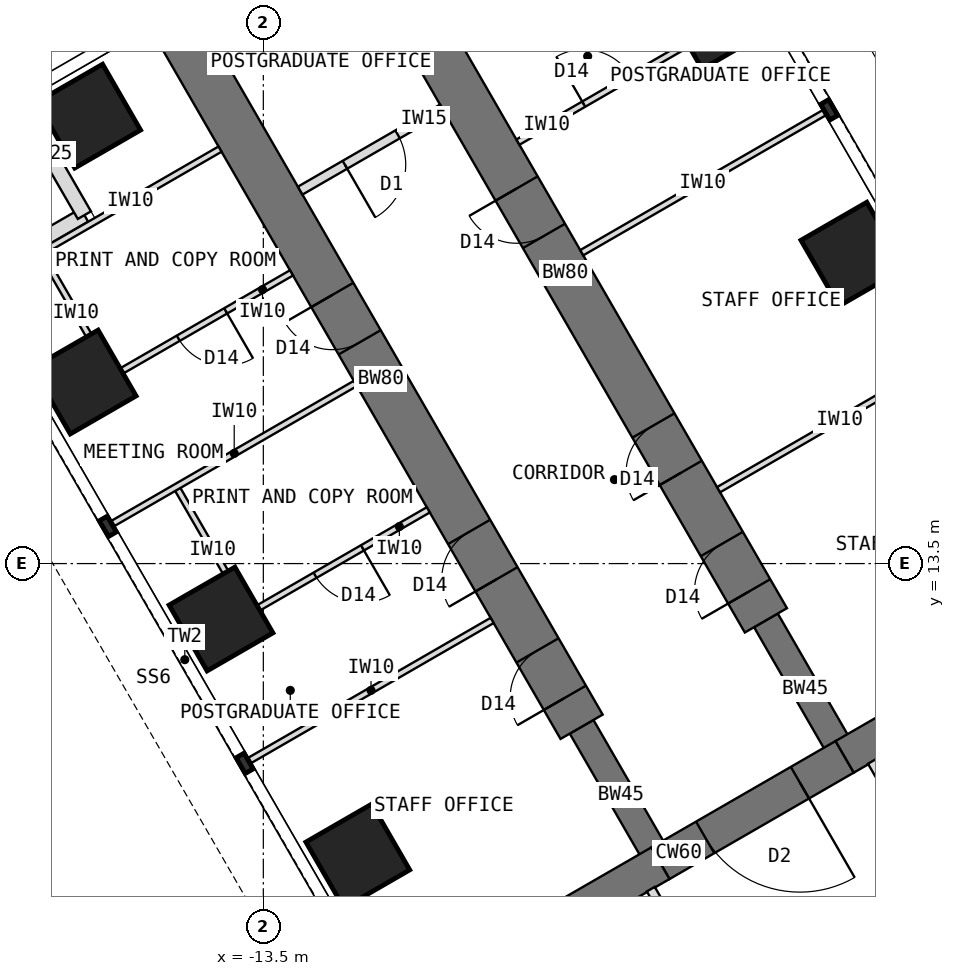
"""IFC4 building model, lengths in metres.
Left out: names, types, materials, properties, quantities, classifications, styles, units other than length and angle.
Written with IfcOpenShell. Run it as: python <this file> out.ifc"""

import sys

from ifc_helpers import new_model, si_unit, direction, frame, frame_2d, origin, origin_2d, place, context, subcontext, project, spatial, rectangle, extrude, element, fill, save


model = new_model("IFC4")
c1 = context("Model", 3, precision=1e-05, world=origin(), true_north=direction((0.0, 1.0)))
c2 = subcontext(c1, "Body", "Model", "MODEL_VIEW")
j1 = project(units=[si_unit("LENGTHUNIT", "METRE"), si_unit("PLANEANGLEUNIT", "RADIAN")], contexts=[c1])
p1 = place(None, origin())
s1 = spatial("IfcSite", under=j1, at=p1, CompositionType="ELEMENT")
p2 = place(p1, origin())
s2 = spatial("IfcBuilding", under=s1, at=p2, CompositionType="ELEMENT")
p3 = place(p2, frame((0.0, 0.0, 157.5)))
s3 = spatial("IfcBuildingStorey", under=s2, at=p3, CompositionType="ELEMENT", Elevation=157.5)
p4 = place(p3, frame((0.0, 12.596, 0.0), z_axis=(0.0, 0.0, 1.0), x_axis=(-0.866011268655, -0.500024481964, 0.0)))
e1 = element("IfcWall", 1, at=p4, inside=s3, PredefinedType="SHEAR", context=c2, shape_type="SweptSolid", body=[
    extrude(rectangle(XDim=4.548, YDim=0.6, at=frame_2d((2.274, 0.0))), origin(), (0.0, 0.0, 1.0), 4.0),
])
p5 = place(p3, frame((-3.939, 10.322, 0.0), z_axis=(0.0, 0.0, 1.0), x_axis=(-0.866019471182, -0.500010275428, 0.0)))
e2 = element("IfcWall", 2, at=p5, inside=s3, PredefinedType="SHEAR", context=c2, shape_type="SweptSolid", body=[
    extrude(rectangle(XDim=3.5, YDim=0.6, at=frame_2d((1.75, 0.0))), origin(), (0.0, 0.0, 1.0), 4.0),
])
p6 = place(p5, frame((0.85, 0.0, 0.0)))
e3 = element("IfcOpeningElement", 3, at=p6, cuts=e2, PredefinedType="OPENING", context=c2, shape_type="SweptSolid", body=[
    extrude(rectangle(XDim=1.8, YDim=2.1, at=frame_2d((0.9, 1.05))), frame((0.0, 0.31, 0.0), z_axis=(0.0, -1.0, 0.0), x_axis=(1.0, 0.0, 0.0)), (0.0, 0.0, 1.0), 0.62),
])
p7 = place(p3, frame((-6.97, 8.572, 0.0), z_axis=(0.0, 0.0, 1.0), x_axis=(-0.866034513004, -0.499984222037, 0.0)))
e4 = element("IfcWall", 4, at=p7, inside=s3, PredefinedType="SHEAR", context=c2, shape_type="SweptSolid", body=[
    extrude(rectangle(XDim=4.548, YDim=0.6, at=frame_2d((2.274, 0.0))), origin(), (0.0, 0.0, 1.0), 4.0),
])
p8 = place(p3, frame((-6.97, 8.572, 0.0), z_axis=(0.0, 0.0, 1.0), x_axis=(-0.499988811324, 0.866031863473, 0.0)))
e5 = element("IfcWall", 5, at=p8, inside=s3, PredefinedType="SHEAR", context=c2, shape_type="SweptSolid", body=[
    extrude(rectangle(XDim=2.592, YDim=0.45, at=frame_2d((1.296, 0.0))), origin(), (0.0, 0.0, 1.0), 4.0),
])
p9 = place(p3, frame((-8.266, 10.816, 0.0), z_axis=(0.0, 0.0, 1.0), x_axis=(-0.499996231654, 0.866027579429, 0.0)))
e6 = element("IfcWall", 6, at=p9, inside=s3, PredefinedType="SHEAR", context=c2, shape_type="SweptSolid", body=[
    extrude(rectangle(XDim=13.2, YDim=0.8, at=frame_2d((6.6, 0.0))), origin(), (0.0, 0.0, 1.0), 4.0),
])
p10 = place(p9, frame((0.55, 0.0, 0.0)))
e7 = element("IfcOpeningElement", 7, at=p10, cuts=e6, PredefinedType="OPENING", context=c2, shape_type="SweptSolid", body=[
    extrude(rectangle(XDim=0.9, YDim=2.1, at=frame_2d((0.45, 1.05))), frame((0.0, 0.41, 0.0), z_axis=(0.0, -1.0, 0.0), x_axis=(1.0, 0.0, 0.0)), (0.0, 0.0, 1.0), 0.82),
])
p11 = place(p9, frame((2.8, 0.0, 0.0)))
e8 = element("IfcOpeningElement", 8, at=p11, cuts=e6, PredefinedType="OPENING", context=c2, shape_type="SweptSolid", body=[
    extrude(rectangle(XDim=0.9, YDim=2.1, at=frame_2d((0.45, 1.05))), frame((0.0, 0.41, 0.0), z_axis=(0.0, -1.0, 0.0), x_axis=(1.0, 0.0, 0.0)), (0.0, 0.0, 1.0), 0.82),
])
p12 = place(p9, frame((7.3, 0.0, 0.0)))
e9 = element("IfcOpeningElement", 9, at=p12, cuts=e6, PredefinedType="OPENING", context=c2, shape_type="SweptSolid", body=[
    extrude(rectangle(XDim=0.9, YDim=2.1, at=frame_2d((0.45, 1.05))), frame((0.0, 0.41, 0.0), z_axis=(0.0, -1.0, 0.0), x_axis=(1.0, 0.0, 0.0)), (0.0, 0.0, 1.0), 0.82),
])
p13 = place(p3, frame((-3.939, 10.322, 0.0), z_axis=(0.0, 0.0, 1.0), x_axis=(-0.499918158782, 0.866072649678, 0.0)))
e10 = element("IfcWall", 10, at=p13, inside=s3, PredefinedType="SHEAR", context=c2, shape_type="SweptSolid", body=[
    extrude(rectangle(XDim=2.592, YDim=0.45, at=frame_2d((1.296, 0.0))), origin(), (0.0, 0.0, 1.0), 4.0),
])
p14 = place(p3, frame((-5.234, 12.566, 0.0), z_axis=(0.0, 0.0, 1.0), x_axis=(-0.500010103361, 0.866019570528, 0.0)))
e11 = element("IfcWall", 11, at=p14, inside=s3, PredefinedType="SHEAR", context=c2, shape_type="SweptSolid", body=[
    extrude(rectangle(XDim=13.2, YDim=0.8, at=frame_2d((6.6, 0.0))), origin(), (0.0, 0.0, 1.0), 4.0),
])
p15 = place(p14, frame((0.55, 0.0, 0.0)))
e12 = element("IfcOpeningElement", 12, at=p15, cuts=e11, PredefinedType="OPENING", context=c2, shape_type="SweptSolid", body=[
    extrude(rectangle(XDim=0.9, YDim=2.1, at=frame_2d((0.45, 1.05))), frame((0.0, 0.41, 0.0), z_axis=(0.0, -1.0, 0.0), x_axis=(1.0, 0.0, 0.0)), (0.0, 0.0, 1.0), 0.82),
])
p16 = place(p14, frame((2.8, 0.0, 0.0)))
e13 = element("IfcOpeningElement", 13, at=p16, cuts=e11, PredefinedType="OPENING", context=c2, shape_type="SweptSolid", body=[
    extrude(rectangle(XDim=0.9, YDim=2.1, at=frame_2d((0.45, 1.05))), frame((0.0, 0.41, 0.0), z_axis=(0.0, -1.0, 0.0), x_axis=(1.0, 0.0, 0.0)), (0.0, 0.0, 1.0), 0.82),
])
p17 = place(p14, frame((7.3, 0.0, 0.0)))
e14 = element("IfcOpeningElement", 14, at=p17, cuts=e11, PredefinedType="OPENING", context=c2, shape_type="SweptSolid", body=[
    extrude(rectangle(XDim=0.9, YDim=2.1, at=frame_2d((0.45, 1.05))), frame((0.0, 0.41, 0.0), z_axis=(0.0, -1.0, 0.0), x_axis=(1.0, 0.0, 0.0)), (0.0, 0.0, 1.0), 0.82),
])
for number, where, z_axis, x_axis in (
    (15, (-11.946, 8.691, 0.0), (0.0, 0.0, 1.0), (0.866, 0.5, 0.0)),
    (16, (-14.196, 12.588, 0.0), (0.0, 0.0, 1.0), (0.866, 0.5, 0.0)),
    (17, (-3.804, 18.588, 0.0), (0.0, 0.0, 1.0), (0.866, 0.5, 0.0)),
    (18, (-16.446, 16.486, 0.0), (0.0, 0.0, 1.0), (0.866, 0.5, 0.0)),
    (19, (-6.054, 22.486, 0.0), (0.0, 0.0, 1.0), (0.866, 0.5, 0.0)),
    (20, (-16.373, 20.858, 0.0), (0.0, 0.0, 1.0), (0.866, 0.5, 0.0)),
):
    element("IfcColumn", number, at=place(p3, frame(where, z_axis=z_axis, x_axis=x_axis)), inside=s3, PredefinedType="COLUMN", context=c2, shape_type="SweptSolid", body=[
        extrude(rectangle(XDim=1.25, YDim=1.25, at=origin_2d()), origin(), (0.0, 0.0, 1.0), 4.0),
    ])
for number, where, z_axis, x_axis in (
    (21, (-18.456, 18.067, 0.0), (0.0, 0.0, 1.0), (0.866, 0.5, 0.0)),
    (22, (-16.443, 19.23, 0.0), (0.0, 0.0, 1.0), (-0.5, 0.866, 0.0)),
):
    element("IfcWall", number, at=place(p3, frame(where, z_axis=z_axis, x_axis=x_axis)), inside=s3, PredefinedType="STANDARD", context=c2, shape_type="SweptSolid", body=[
        extrude(rectangle(XDim=2.325, YDim=0.25, at=frame_2d((1.163, 0.0))), origin(), (0.0, 0.0, 1.0), 3.8),
    ])
for number, where, z_axis, x_axis in (
    (23, (-9.737, 12.565, 0.0), (0.0, 0.0, 1.0), (-0.866, -0.5, 0.0)),
    (24, (-11.987, 16.462, 0.0), (0.0, 0.0, 1.0), (-0.866, -0.5, 0.0)),
):
    element("IfcWall", number, at=place(p3, frame(where, z_axis=z_axis, x_axis=x_axis)), inside=s3, PredefinedType="PARTITIONING", context=c2, shape_type="SweptSolid", body=[
        extrude(rectangle(XDim=4.6, YDim=0.1, at=frame_2d((2.3, 0.0))), origin(), (0.0, 0.0, 1.0), 3.8),
    ])
p18 = place(p3, frame((-13.731, 12.684, 0.0), z_axis=(0.0, 0.0, 1.0), x_axis=(-0.500001309137, 0.866024647952, 0.0)))
e25 = element("IfcWall", 25, at=p18, inside=s3, PredefinedType="PARTITIONING", context=c2, shape_type="SweptSolid", body=[
    extrude(rectangle(XDim=2.4, YDim=0.1, at=frame_2d((1.2, 0.0))), origin(), (0.0, 0.0, 1.0), 3.8),
])
p19 = place(p3, frame((-10.787, 14.384, 0.0), z_axis=(0.0, 0.0, 1.0), x_axis=(-0.866038511948, -0.499977295307, 0.0)))
e26 = element("IfcWall", 26, at=p19, inside=s3, PredefinedType="PARTITIONING", context=c2, shape_type="SweptSolid", body=[
    extrude(rectangle(XDim=3.4, YDim=0.1, at=frame_2d((1.7, 0.0))), origin(), (0.0, 0.0, 1.0), 3.8),
])
p20 = place(p19, frame((1.25, 0.0, 0.0)))
e27 = element("IfcOpeningElement", 27, at=p20, cuts=e26, PredefinedType="OPENING", context=c2, shape_type="SweptSolid", body=[
    extrude(rectangle(XDim=0.9, YDim=2.1, at=frame_2d((0.45, 1.05))), frame((0.0, 0.06, 0.0), z_axis=(0.0, -1.0, 0.0), x_axis=(1.0, 0.0, 0.0)), (0.0, 0.0, 1.0), 0.12),
])
p21 = place(p3, frame((-15.981, 16.581, 0.0), z_axis=(0.0, 0.0, 1.0), x_axis=(-0.499957262057, 0.866050077142, 0.0)))
e28 = element("IfcWall", 28, at=p21, inside=s3, PredefinedType="PARTITIONING", context=c2, shape_type="SweptSolid", body=[
    extrude(rectangle(XDim=2.4, YDim=0.1, at=frame_2d((1.2, 0.0))), origin(), (0.0, 0.0, 1.0), 3.8),
])
p22 = place(p3, frame((-13.037, 18.281, 0.0), z_axis=(0.0, 0.0, 1.0), x_axis=(-0.866007419912, -0.500031147688, 0.0)))
e29 = element("IfcWall", 29, at=p22, inside=s3, PredefinedType="PARTITIONING", context=c2, shape_type="SweptSolid", body=[
    extrude(rectangle(XDim=3.4, YDim=0.1, at=frame_2d((1.7, 0.0))), origin(), (0.0, 0.0, 1.0), 3.8),
])
p23 = place(p22, frame((1.25, 0.0, 0.0)))
e30 = element("IfcOpeningElement", 30, at=p23, cuts=e29, PredefinedType="OPENING", context=c2, shape_type="SweptSolid", body=[
    extrude(rectangle(XDim=0.9, YDim=2.1, at=frame_2d((0.45, 1.05))), frame((0.0, 0.06, 0.0), z_axis=(0.0, -1.0, 0.0), x_axis=(1.0, 0.0, 0.0)), (0.0, 0.0, 1.0), 0.12),
])
p24 = place(p3, frame((-14.212, 20.316, 0.0), z_axis=(0.0, 0.0, 1.0), x_axis=(-0.866007419912, -0.500031147688, 0.0)))
e31 = element("IfcWall", 31, at=p24, inside=s3, PredefinedType="PARTITIONING", context=c2, shape_type="SweptSolid", body=[
    extrude(rectangle(XDim=3.4, YDim=0.1, at=frame_2d((1.7, 0.0))), origin(), (0.0, 0.0, 1.0), 3.8),
])
for number, where, z_axis, x_axis in (
    (32, (-6.013, 14.715, 0.0), (0.0, 0.0, 1.0), (0.866, 0.5, 0.0)),
    (33, (-8.263, 18.612, 0.0), (0.0, 0.0, 1.0), (0.866, 0.5, 0.0)),
):
    element("IfcWall", number, at=place(p3, frame(where, z_axis=z_axis, x_axis=x_axis)), inside=s3, PredefinedType="PARTITIONING", context=c2, shape_type="SweptSolid", body=[
        extrude(rectangle(XDim=4.6, YDim=0.1, at=frame_2d((2.3, 0.0))), origin(), (0.0, 0.0, 1.0), 3.8),
    ])
p25 = place(p3, frame((-9.313, 20.431, 0.0), z_axis=(0.0, 0.0, 1.0), x_axis=(0.866020560687, 0.500008388397, 0.0)))
e34 = element("IfcWall", 34, at=p25, inside=s3, PredefinedType="PARTITIONING", context=c2, shape_type="SweptSolid", body=[
    extrude(rectangle(XDim=3.4, YDim=0.1, at=frame_2d((1.7, 0.0))), origin(), (0.0, 0.0, 1.0), 3.8),
])
p26 = place(p25, frame((1.25, 0.0, 0.0)))
e35 = element("IfcOpeningElement", 35, at=p26, cuts=e34, PredefinedType="OPENING", context=c2, shape_type="SweptSolid", body=[
    extrude(rectangle(XDim=0.9, YDim=2.1, at=frame_2d((0.45, 1.05))), frame((0.0, 0.06, 0.0), z_axis=(0.0, -1.0, 0.0), x_axis=(1.0, 0.0, 0.0)), (0.0, 0.0, 1.0), 0.12),
])
p27 = place(p3, frame((-4.89, 4.27, 0.0), z_axis=(0.0, 0.0, 1.0), x_axis=(-0.499999473313, 0.866025707867, 0.0)))
e36 = element("IfcWall", 36, at=p27, inside=s3, PredefinedType="PARTITIONING", context=c2, shape_type="SweptSolid", body=[
    extrude(rectangle(XDim=4.476, YDim=0.15, at=frame_2d((2.238, 0.0))), origin(), (0.0, 0.0, 1.0), 3.8),
])
p28 = place(p27, frame((0.843, 0.0, 0.0)))
e37 = element("IfcOpeningElement", 37, at=p28, cuts=e36, PredefinedType="OPENING", context=c2, shape_type="SweptSolid", body=[
    extrude(rectangle(XDim=1.0, YDim=2.1, at=frame_2d((0.5, 1.05))), frame((0.0, 0.085, 0.0), z_axis=(0.0, -1.0, 0.0), x_axis=(1.0, 0.0, 0.0)), (0.0, 0.0, 1.0), 0.17),
])
p29 = place(p3, frame((-3.49, 10.246, 0.0), z_axis=(0.0, 0.0, 1.0), x_axis=(0.499999473313, -0.866025707867, 0.0)))
e38 = element("IfcWall", 38, at=p29, inside=s3, PredefinedType="PARTITIONING", context=c2, shape_type="SweptSolid", body=[
    extrude(rectangle(XDim=4.476, YDim=0.15, at=frame_2d((2.238, 0.0))), origin(), (0.0, 0.0, 1.0), 3.8),
])
p30 = place(p29, frame((0.843, 0.0, 0.0)))
e39 = element("IfcOpeningElement", 39, at=p30, cuts=e38, PredefinedType="OPENING", context=c2, shape_type="SweptSolid", body=[
    extrude(rectangle(XDim=1.0, YDim=2.1, at=frame_2d((0.5, 1.05))), frame((0.0, 0.085, 0.0), z_axis=(0.0, -1.0, 0.0), x_axis=(1.0, 0.0, 0.0)), (0.0, 0.0, 1.0), 0.17),
])
p31 = place(p3, frame((-10.556, 20.983, 0.0), z_axis=(0.0, 0.0, 1.0), x_axis=(-0.86599734893, -0.500048589285, 0.0)))
e40 = element("IfcWall", 40, at=p31, inside=s3, PredefinedType="PARTITIONING", context=c2, shape_type="SweptSolid", body=[
    extrude(rectangle(XDim=2.7, YDim=0.15, at=frame_2d((1.35, 0.0))), origin(), (0.0, 0.0, 1.0), 3.8),
])
p32 = place(p31, frame((0.85, 0.0, 0.0)))
e41 = element("IfcOpeningElement", 41, at=p32, cuts=e40, PredefinedType="OPENING", context=c2, shape_type="SweptSolid", body=[
    extrude(rectangle(XDim=1.0, YDim=2.1, at=frame_2d((0.5, 1.05))), frame((0.0, 0.085, 0.0), z_axis=(0.0, -1.0, 0.0), x_axis=(1.0, 0.0, 0.0)), (0.0, 0.0, 1.0), 0.17),
])
p33 = place(p6, origin())
e42 = element("IfcDoor", 42, at=p33, inside=s3, OperationType="DOUBLE_DOOR_DOUBLE_SWING", PredefinedType="DOOR", context=c2, shape_type="SweptSolid", body=[
    extrude(rectangle(XDim=1.72, YDim=2.06, at=frame_2d((0.9, 1.03))), frame((0.0, 0.025, 0.0), z_axis=(0.0, -1.0, 0.0), x_axis=(1.0, 0.0, 0.0)), (0.0, 0.0, 1.0), 0.05),
    extrude(rectangle(XDim=0.04, YDim=2.1, at=frame_2d((0.02, 1.05))), frame((0.0, 0.3, 0.0), z_axis=(0.0, -1.0, 0.0), x_axis=(1.0, 0.0, 0.0)), (0.0, 0.0, 1.0), 0.6),
    extrude(rectangle(XDim=0.04, YDim=2.1, at=frame_2d((1.78, 1.05))), frame((0.0, 0.3, 0.0), z_axis=(0.0, -1.0, 0.0), x_axis=(1.0, 0.0, 0.0)), (0.0, 0.0, 1.0), 0.6),
    extrude(rectangle(XDim=1.72, YDim=0.04, at=frame_2d((0.9, 2.08))), frame((0.0, 0.3, 0.0), z_axis=(0.0, -1.0, 0.0), x_axis=(1.0, 0.0, 0.0)), (0.0, 0.0, 1.0), 0.6),
])
fill(e3, e42)
p34 = place(p20, origin())
e43 = element("IfcDoor", 43, at=p34, inside=s3, OperationType="SINGLE_SWING_LEFT", PredefinedType="DOOR", context=c2, shape_type="SweptSolid", body=[
    extrude(rectangle(XDim=0.9, YDim=2.1, at=frame_2d((0.45, 1.05))), frame((0.0, 0.025, 0.0), z_axis=(0.0, -1.0, 0.0), x_axis=(1.0, 0.0, 0.0)), (0.0, 0.0, 1.0), 0.05),
])
fill(e27, e43)
p35 = place(p23, origin())
e44 = element("IfcDoor", 44, at=p35, inside=s3, OperationType="SINGLE_SWING_LEFT", PredefinedType="DOOR", context=c2, shape_type="SweptSolid", body=[
    extrude(rectangle(XDim=0.9, YDim=2.1, at=frame_2d((0.45, 1.05))), frame((0.0, 0.025, 0.0), z_axis=(0.0, -1.0, 0.0), x_axis=(1.0, 0.0, 0.0)), (0.0, 0.0, 1.0), 0.05),
])
fill(e30, e44)
p36 = place(p26, origin())
e45 = element("IfcDoor", 45, at=p36, inside=s3, OperationType="SINGLE_SWING_LEFT", PredefinedType="DOOR", context=c2, shape_type="SweptSolid", body=[
    extrude(rectangle(XDim=0.9, YDim=2.1, at=frame_2d((0.45, 1.05))), frame((0.0, 0.025, 0.0), z_axis=(0.0, -1.0, 0.0), x_axis=(1.0, 0.0, 0.0)), (0.0, 0.0, 1.0), 0.05),
])
fill(e35, e45)
p37 = place(p32, origin())
e46 = element("IfcDoor", 46, at=p37, inside=s3, OperationType="SINGLE_SWING_RIGHT", PredefinedType="DOOR", context=c2, shape_type="SweptSolid", body=[
    extrude(rectangle(XDim=1.0, YDim=2.1, at=frame_2d((0.5, 1.05))), frame((0.0, 0.025, 0.0), z_axis=(0.0, -1.0, 0.0), x_axis=(1.0, 0.0, 0.0)), (0.0, 0.0, 1.0), 0.05),
])
fill(e41, e46)
p38 = place(p10, origin())
e47 = element("IfcDoor", 47, at=p38, inside=s3, OperationType="SINGLE_SWING_LEFT", PredefinedType="DOOR", context=c2, shape_type="SweptSolid", body=[
    extrude(rectangle(XDim=0.82, YDim=2.06, at=frame_2d((0.45, 1.03))), frame((0.0, 0.025, 0.0), z_axis=(0.0, -1.0, 0.0), x_axis=(1.0, 0.0, 0.0)), (0.0, 0.0, 1.0), 0.05),
    extrude(rectangle(XDim=0.04, YDim=2.1, at=frame_2d((0.02, 1.05))), frame((0.0, 0.4, 0.0), z_axis=(0.0, -1.0, 0.0), x_axis=(1.0, 0.0, 0.0)), (0.0, 0.0, 1.0), 0.8),
    extrude(rectangle(XDim=0.04, YDim=2.1, at=frame_2d((0.88, 1.05))), frame((0.0, 0.4, 0.0), z_axis=(0.0, -1.0, 0.0), x_axis=(1.0, 0.0, 0.0)), (0.0, 0.0, 1.0), 0.8),
    extrude(rectangle(XDim=0.82, YDim=0.04, at=frame_2d((0.45, 2.08))), frame((0.0, 0.4, 0.0), z_axis=(0.0, -1.0, 0.0), x_axis=(1.0, 0.0, 0.0)), (0.0, 0.0, 1.0), 0.8),
])
fill(e7, e47)
p39 = place(p11, origin())
e48 = element("IfcDoor", 48, at=p39, inside=s3, OperationType="SINGLE_SWING_LEFT", PredefinedType="DOOR", context=c2, shape_type="SweptSolid", body=[
    extrude(rectangle(XDim=0.82, YDim=2.06, at=frame_2d((0.45, 1.03))), frame((0.0, 0.025, 0.0), z_axis=(0.0, -1.0, 0.0), x_axis=(1.0, 0.0, 0.0)), (0.0, 0.0, 1.0), 0.05),
    extrude(rectangle(XDim=0.04, YDim=2.1, at=frame_2d((0.02, 1.05))), frame((0.0, 0.4, 0.0), z_axis=(0.0, -1.0, 0.0), x_axis=(1.0, 0.0, 0.0)), (0.0, 0.0, 1.0), 0.8),
    extrude(rectangle(XDim=0.04, YDim=2.1, at=frame_2d((0.88, 1.05))), frame((0.0, 0.4, 0.0), z_axis=(0.0, -1.0, 0.0), x_axis=(1.0, 0.0, 0.0)), (0.0, 0.0, 1.0), 0.8),
    extrude(rectangle(XDim=0.82, YDim=0.04, at=frame_2d((0.45, 2.08))), frame((0.0, 0.4, 0.0), z_axis=(0.0, -1.0, 0.0), x_axis=(1.0, 0.0, 0.0)), (0.0, 0.0, 1.0), 0.8),
])
fill(e8, e48)
p40 = place(p12, origin())
e49 = element("IfcDoor", 49, at=p40, inside=s3, OperationType="SINGLE_SWING_RIGHT", PredefinedType="DOOR", context=c2, shape_type="SweptSolid", body=[
    extrude(rectangle(XDim=0.82, YDim=2.06, at=frame_2d((0.45, 1.03))), frame((0.0, 0.025, 0.0), z_axis=(0.0, -1.0, 0.0), x_axis=(1.0, 0.0, 0.0)), (0.0, 0.0, 1.0), 0.05),
    extrude(rectangle(XDim=0.04, YDim=2.1, at=frame_2d((0.02, 1.05))), frame((0.0, 0.4, 0.0), z_axis=(0.0, -1.0, 0.0), x_axis=(1.0, 0.0, 0.0)), (0.0, 0.0, 1.0), 0.8),
    extrude(rectangle(XDim=0.04, YDim=2.1, at=frame_2d((0.88, 1.05))), frame((0.0, 0.4, 0.0), z_axis=(0.0, -1.0, 0.0), x_axis=(1.0, 0.0, 0.0)), (0.0, 0.0, 1.0), 0.8),
    extrude(rectangle(XDim=0.82, YDim=0.04, at=frame_2d((0.45, 2.08))), frame((0.0, 0.4, 0.0), z_axis=(0.0, -1.0, 0.0), x_axis=(1.0, 0.0, 0.0)), (0.0, 0.0, 1.0), 0.8),
])
fill(e9, e49)
p41 = place(p15, origin())
e50 = element("IfcDoor", 50, at=p41, inside=s3, OperationType="SINGLE_SWING_LEFT", PredefinedType="DOOR", context=c2, shape_type="SweptSolid", body=[
    extrude(rectangle(XDim=0.82, YDim=2.06, at=frame_2d((0.45, 1.03))), frame((0.0, 0.025, 0.0), z_axis=(0.0, -1.0, 0.0), x_axis=(1.0, 0.0, 0.0)), (0.0, 0.0, 1.0), 0.05),
    extrude(rectangle(XDim=0.04, YDim=2.1, at=frame_2d((0.02, 1.05))), frame((0.0, 0.4, 0.0), z_axis=(0.0, -1.0, 0.0), x_axis=(1.0, 0.0, 0.0)), (0.0, 0.0, 1.0), 0.8),
    extrude(rectangle(XDim=0.04, YDim=2.1, at=frame_2d((0.88, 1.05))), frame((0.0, 0.4, 0.0), z_axis=(0.0, -1.0, 0.0), x_axis=(1.0, 0.0, 0.0)), (0.0, 0.0, 1.0), 0.8),
    extrude(rectangle(XDim=0.82, YDim=0.04, at=frame_2d((0.45, 2.08))), frame((0.0, 0.4, 0.0), z_axis=(0.0, -1.0, 0.0), x_axis=(1.0, 0.0, 0.0)), (0.0, 0.0, 1.0), 0.8),
])
fill(e12, e50)
p42 = place(p16, origin())
e51 = element("IfcDoor", 51, at=p42, inside=s3, OperationType="SINGLE_SWING_LEFT", PredefinedType="DOOR", context=c2, shape_type="SweptSolid", body=[
    extrude(rectangle(XDim=0.82, YDim=2.06, at=frame_2d((0.45, 1.03))), frame((0.0, 0.025, 0.0), z_axis=(0.0, -1.0, 0.0), x_axis=(1.0, 0.0, 0.0)), (0.0, 0.0, 1.0), 0.05),
    extrude(rectangle(XDim=0.04, YDim=2.1, at=frame_2d((0.02, 1.05))), frame((0.0, 0.4, 0.0), z_axis=(0.0, -1.0, 0.0), x_axis=(1.0, 0.0, 0.0)), (0.0, 0.0, 1.0), 0.8),
    extrude(rectangle(XDim=0.04, YDim=2.1, at=frame_2d((0.88, 1.05))), frame((0.0, 0.4, 0.0), z_axis=(0.0, -1.0, 0.0), x_axis=(1.0, 0.0, 0.0)), (0.0, 0.0, 1.0), 0.8),
    extrude(rectangle(XDim=0.82, YDim=0.04, at=frame_2d((0.45, 2.08))), frame((0.0, 0.4, 0.0), z_axis=(0.0, -1.0, 0.0), x_axis=(1.0, 0.0, 0.0)), (0.0, 0.0, 1.0), 0.8),
])
fill(e13, e51)
p43 = place(p17, origin())
e52 = element("IfcDoor", 52, at=p43, inside=s3, OperationType="SINGLE_SWING_RIGHT", PredefinedType="DOOR", context=c2, shape_type="SweptSolid", body=[
    extrude(rectangle(XDim=0.82, YDim=2.06, at=frame_2d((0.45, 1.03))), frame((0.0, 0.025, 0.0), z_axis=(0.0, -1.0, 0.0), x_axis=(1.0, 0.0, 0.0)), (0.0, 0.0, 1.0), 0.05),
    extrude(rectangle(XDim=0.04, YDim=2.1, at=frame_2d((0.02, 1.05))), frame((0.0, 0.4, 0.0), z_axis=(0.0, -1.0, 0.0), x_axis=(1.0, 0.0, 0.0)), (0.0, 0.0, 1.0), 0.8),
    extrude(rectangle(XDim=0.04, YDim=2.1, at=frame_2d((0.88, 1.05))), frame((0.0, 0.4, 0.0), z_axis=(0.0, -1.0, 0.0), x_axis=(1.0, 0.0, 0.0)), (0.0, 0.0, 1.0), 0.8),
    extrude(rectangle(XDim=0.82, YDim=0.04, at=frame_2d((0.45, 2.08))), frame((0.0, 0.4, 0.0), z_axis=(0.0, -1.0, 0.0), x_axis=(1.0, 0.0, 0.0)), (0.0, 0.0, 1.0), 0.8),
])
fill(e14, e52)
save(model, sys.argv[1])
